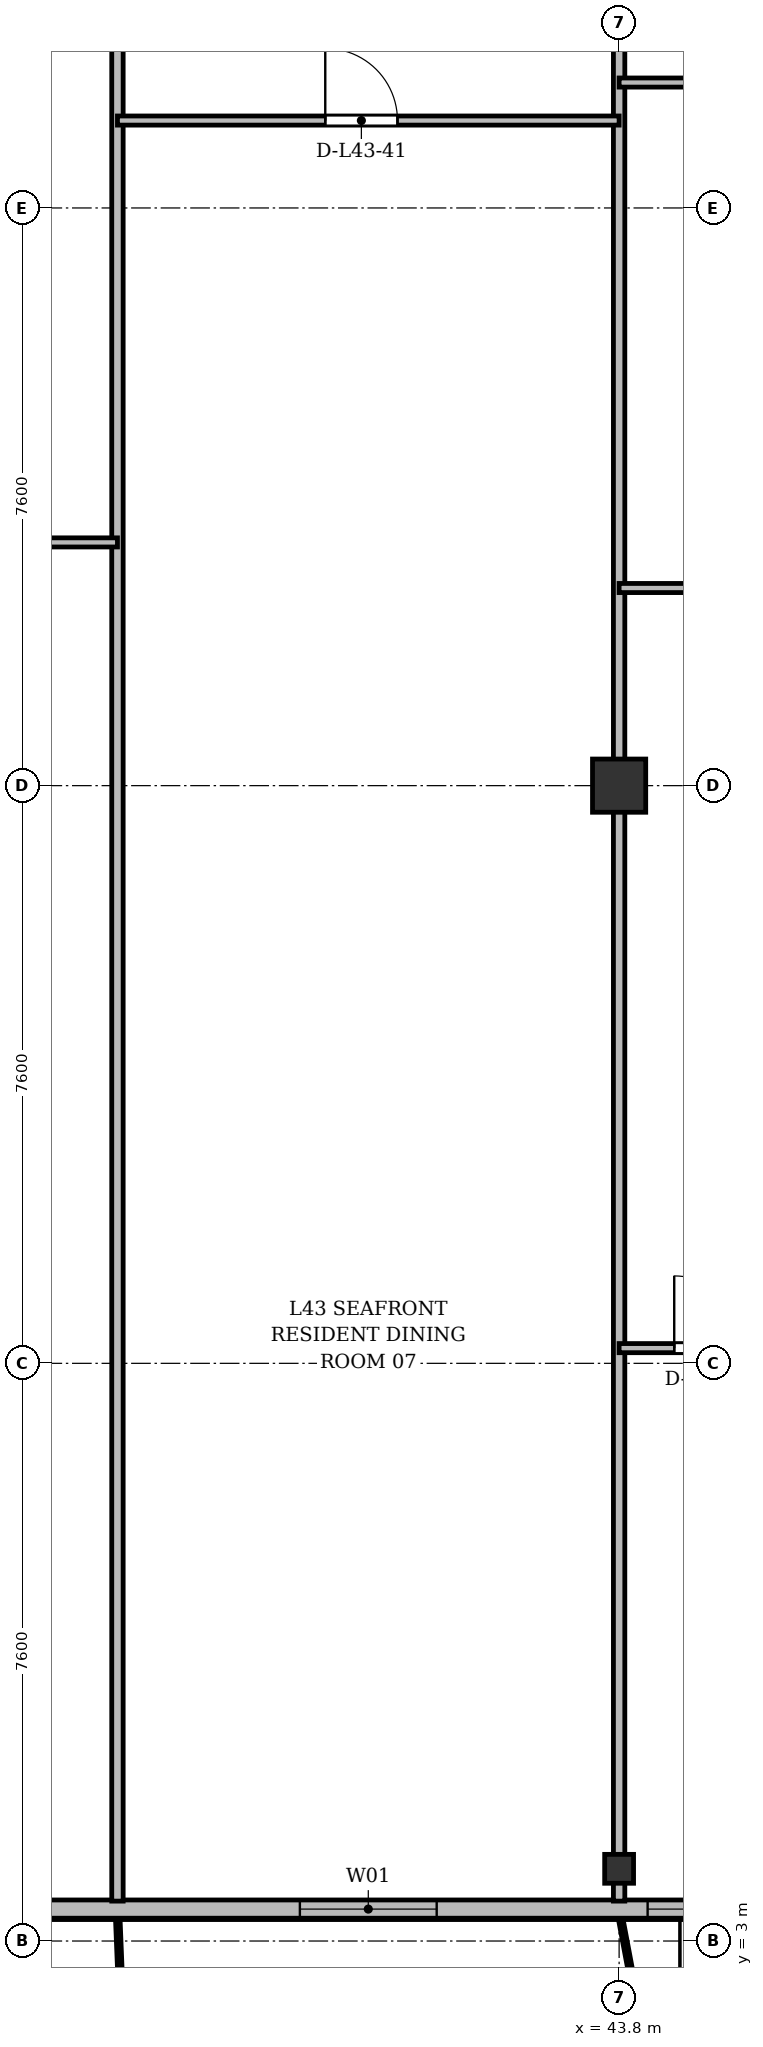
"""IFC4 building model, lengths in metres.
Left out: names, types, materials, properties, quantities, classifications, styles, units other than length and angle.
Written with IfcOpenShell. Run it as: python <this file> out.ifc"""

import sys

from ifc_helpers import new_model, si_unit, direction, frame, frame_2d, origin, origin_2d, place, context, subcontext, project, spatial, rectangle, i_section, extrude, source, transform, mapped, element, fill, save


model = new_model("IFC4")
c1 = context("Model", 3, precision=1e-05, world=origin(), true_north=direction((0.0, 1.0)))
c2 = subcontext(c1, "Body", "Model", "MODEL_VIEW")
j1 = project(units=[si_unit("LENGTHUNIT", "METRE"), si_unit("PLANEANGLEUNIT", "RADIAN")], contexts=[c1])
p1 = place(None, origin())
s1 = spatial("IfcSite", under=j1, at=p1, CompositionType="ELEMENT")
p2 = place(p1, origin())
s2 = spatial("IfcBuilding", under=s1, at=p2, CompositionType="ELEMENT")
p3 = place(p2, frame((0.0, 0.0, 164.5)))
s3 = spatial("IfcBuildingStorey", under=s2, at=p3, CompositionType="ELEMENT", Elevation=164.5)
m1 = source(origin(), c2, "Body", "SweptSolid", [
    extrude(i_section(OverallWidth=0.38, OverallDepth=0.38, WebThickness=0.02, FlangeThickness=0.03, at=origin_2d()), origin(), (0.0, 0.0, 1.0), 3.6),
])
p4 = place(p3, frame((43.8, 3.95, 0.0), z_axis=(0.0, 0.0, 1.0), x_axis=(1.0, 0.0, 0.0)))
e1 = element("IfcColumn", 1, at=p4, inside=s3, PredefinedType="COLUMN", context=c2, shape_type="MappedRepresentation", body=[
    mapped(m1, transform((0.0, 0.0, 0.0), x_axis=(1.0, 0.0, 0.0), y_axis=(0.0, 1.0, 0.0), z_axis=(0.0, 0.0, 1.0), scale=1.0)),
])
m2 = source(origin(), c2, "Body", "SweptSolid", [
    extrude(rectangle(XDim=0.7, YDim=0.7, at=origin_2d()), origin(), (0.0, 0.0, 1.0), 3.6),
])
p5 = place(p3, frame((43.8, 18.2, 0.0), z_axis=(0.0, 0.0, 1.0), x_axis=(1.0, 0.0, 0.0)))
e2 = element("IfcColumn", 2, at=p5, inside=s3, PredefinedType="COLUMN", context=c2, shape_type="MappedRepresentation", body=[
    mapped(m2, transform((0.0, 0.0, 0.0), x_axis=(1.0, 0.0, 0.0), y_axis=(0.0, 1.0, 0.0), z_axis=(0.0, 0.0, 1.0), scale=1.0)),
])
p6 = place(p3, frame((63.6, 3.42, 0.0), z_axis=(0.0, 0.0, 1.0), x_axis=(-1.0, 0.0, 0.0)))
e3 = element("IfcWall", 3, at=p6, inside=s3, PredefinedType="SOLIDWALL", context=c2, shape_type="SweptSolid", body=[
    extrude(rectangle(XDim=52.8, YDim=0.24, at=frame_2d((26.4, 0.0))), origin(), (0.0, 0.0, 1.0), 3.35),
])
p7 = place(p6, frame((1.445, 0.0, 0.9)))
e4 = element("IfcOpeningElement", 4, at=p7, cuts=e3, PredefinedType="OPENING", context=c2, shape_type="SweptSolid", body=[
    extrude(rectangle(XDim=2.0, YDim=1.95, at=frame_2d((1.0, 0.975))), frame((0.0, 0.13, 0.0), z_axis=(0.0, -1.0, 0.0), x_axis=(1.0, 0.0, 0.0)), (0.0, 0.0, 1.0), 0.26),
])
p8 = place(p6, frame((5.275, 0.0, 0.9)))
e5 = element("IfcOpeningElement", 5, at=p8, cuts=e3, PredefinedType="OPENING", context=c2, shape_type="SweptSolid", body=[
    extrude(rectangle(XDim=1.65, YDim=1.85, at=frame_2d((0.825, 0.925))), frame((0.0, 0.13, 0.0), z_axis=(0.0, -1.0, 0.0), x_axis=(1.0, 0.0, 0.0)), (0.0, 0.0, 1.0), 0.26),
])
p9 = place(p6, frame((7.65, 0.0, 0.9)))
e6 = element("IfcOpeningElement", 6, at=p9, cuts=e3, PredefinedType="OPENING", context=c2, shape_type="SweptSolid", body=[
    extrude(rectangle(XDim=1.5, YDim=1.75, at=frame_2d((0.75, 0.875))), frame((0.0, 0.13, 0.0), z_axis=(0.0, -1.0, 0.0), x_axis=(1.0, 0.0, 0.0)), (0.0, 0.0, 1.0), 0.26),
])
p10 = place(p6, frame((9.9, 0.0, 0.9)))
e7 = element("IfcOpeningElement", 7, at=p10, cuts=e3, PredefinedType="OPENING", context=c2, shape_type="SweptSolid", body=[
    extrude(rectangle(XDim=2.2, YDim=1.8, at=frame_2d((1.1, 0.9))), frame((0.0, 0.13, 0.0), z_axis=(0.0, -1.0, 0.0), x_axis=(1.0, 0.0, 0.0)), (0.0, 0.0, 1.0), 0.26),
])
p11 = place(p6, frame((13.62, 0.0, 0.0)))
e8 = element("IfcOpeningElement", 8, at=p11, cuts=e3, PredefinedType="OPENING", context=c2, shape_type="SweptSolid", body=[
    extrude(rectangle(XDim=1.2, YDim=2.2, at=frame_2d((0.6, 1.1))), frame((0.0, 0.13, 0.0), z_axis=(0.0, -1.0, 0.0), x_axis=(1.0, 0.0, 0.0)), (0.0, 0.0, 1.0), 0.26),
])
p12 = place(p6, frame((15.45, 0.0, 0.9)))
e9 = element("IfcOpeningElement", 9, at=p12, cuts=e3, PredefinedType="OPENING", context=c2, shape_type="SweptSolid", body=[
    extrude(rectangle(XDim=1.5, YDim=1.75, at=frame_2d((0.75, 0.875))), frame((0.0, 0.13, 0.0), z_axis=(0.0, -1.0, 0.0), x_axis=(1.0, 0.0, 0.0)), (0.0, 0.0, 1.0), 0.26),
])
p13 = place(p6, frame((17.775, 0.0, 0.9)))
e10 = element("IfcOpeningElement", 10, at=p13, cuts=e3, PredefinedType="OPENING", context=c2, shape_type="SweptSolid", body=[
    extrude(rectangle(XDim=1.65, YDim=1.85, at=frame_2d((0.825, 0.925))), frame((0.0, 0.13, 0.0), z_axis=(0.0, -1.0, 0.0), x_axis=(1.0, 0.0, 0.0)), (0.0, 0.0, 1.0), 0.26),
])
p14 = place(p6, frame((22.2, 0.0, 0.9)))
e11 = element("IfcOpeningElement", 11, at=p14, cuts=e3, PredefinedType="OPENING", context=c2, shape_type="SweptSolid", body=[
    extrude(rectangle(XDim=1.8, YDim=1.8, at=frame_2d((0.9, 0.9))), frame((0.0, 0.13, 0.0), z_axis=(0.0, -1.0, 0.0), x_axis=(1.0, 0.0, 0.0)), (0.0, 0.0, 1.0), 0.26),
])
p15 = place(p6, frame((28.6, 0.0, 0.9)))
e12 = element("IfcOpeningElement", 12, at=p15, cuts=e3, PredefinedType="OPENING", context=c2, shape_type="SweptSolid", body=[
    extrude(rectangle(XDim=2.2, YDim=1.8, at=frame_2d((1.1, 0.9))), frame((0.0, 0.13, 0.0), z_axis=(0.0, -1.0, 0.0), x_axis=(1.0, 0.0, 0.0)), (0.0, 0.0, 1.0), 0.26),
])
p16 = place(p6, frame((35.85, 0.0, 0.9)))
e13 = element("IfcOpeningElement", 13, at=p16, cuts=e3, PredefinedType="OPENING", context=c2, shape_type="SweptSolid", body=[
    extrude(rectangle(XDim=1.5, YDim=1.75, at=frame_2d((0.75, 0.875))), frame((0.0, 0.13, 0.0), z_axis=(0.0, -1.0, 0.0), x_axis=(1.0, 0.0, 0.0)), (0.0, 0.0, 1.0), 0.26),
])
p17 = place(p6, frame((41.656, 0.0, 0.0)))
e14 = element("IfcOpeningElement", 14, at=p17, cuts=e3, PredefinedType="OPENING", context=c2, shape_type="SweptSolid", body=[
    extrude(rectangle(XDim=1.2, YDim=2.2, at=frame_2d((0.6, 1.1))), frame((0.0, 0.13, 0.0), z_axis=(0.0, -1.0, 0.0), x_axis=(1.0, 0.0, 0.0)), (0.0, 0.0, 1.0), 0.26),
])
p18 = place(p6, frame((43.65, 0.0, 0.9)))
e15 = element("IfcOpeningElement", 15, at=p18, cuts=e3, PredefinedType="OPENING", context=c2, shape_type="SweptSolid", body=[
    extrude(rectangle(XDim=1.5, YDim=1.75, at=frame_2d((0.75, 0.875))), frame((0.0, 0.13, 0.0), z_axis=(0.0, -1.0, 0.0), x_axis=(1.0, 0.0, 0.0)), (0.0, 0.0, 1.0), 0.26),
])
p19 = place(p6, frame((45.8, 0.0, 0.9)))
e16 = element("IfcOpeningElement", 16, at=p19, cuts=e3, PredefinedType="OPENING", context=c2, shape_type="SweptSolid", body=[
    extrude(rectangle(XDim=1.8, YDim=1.8, at=frame_2d((0.9, 0.9))), frame((0.0, 0.13, 0.0), z_axis=(0.0, -1.0, 0.0), x_axis=(1.0, 0.0, 0.0)), (0.0, 0.0, 1.0), 0.26),
])
p20 = place(p6, frame((49.255, 0.0, 0.9)))
e17 = element("IfcOpeningElement", 17, at=p20, cuts=e3, PredefinedType="OPENING", context=c2, shape_type="SweptSolid", body=[
    extrude(rectangle(XDim=2.2, YDim=1.8, at=frame_2d((1.1, 0.9))), frame((0.0, 0.13, 0.0), z_axis=(0.0, -1.0, 0.0), x_axis=(1.0, 0.0, 0.0)), (0.0, 0.0, 1.0), 0.26),
])
p21 = place(p3, frame((37.2, 3.525, 0.0), z_axis=(0.0, 0.0, 1.0), x_axis=(0.0, 1.0, 0.0)))
e18 = element("IfcWall", 18, at=p21, inside=s3, PredefinedType="PARTITIONING", context=c2, shape_type="SweptSolid", body=[
    extrude(rectangle(XDim=27.275, YDim=0.15, at=frame_2d((13.638, 0.0))), origin(), (0.0, 0.0, 1.0), 2.75),
])
p22 = place(p3, frame((43.8, 3.525, 0.0), z_axis=(0.0, 0.0, 1.0), x_axis=(0.0, 1.0, 0.0)))
e19 = element("IfcWall", 19, at=p22, inside=s3, PredefinedType="PARTITIONING", context=c2, shape_type="SweptSolid", body=[
    extrude(rectangle(XDim=27.275, YDim=0.15, at=frame_2d((13.638, 0.0))), origin(), (0.0, 0.0, 1.0), 2.85),
])
p23 = place(p3, frame((30.6, 21.4, 0.0), z_axis=(0.0, 0.0, 1.0), x_axis=(1.0, 0.0, 0.0)))
e20 = element("IfcWall", 20, at=p23, inside=s3, PredefinedType="PARTITIONING", context=c2, shape_type="SweptSolid", body=[
    extrude(rectangle(XDim=6.6, YDim=0.12, at=frame_2d((3.3, 0.0))), origin(), (0.0, 0.0, 1.0), 2.85),
])
p24 = place(p23, frame((2.734, 0.0, 0.0)))
e21 = element("IfcOpeningElement", 21, at=p24, cuts=e20, PredefinedType="OPENING", context=c2, shape_type="SweptSolid", body=[
    extrude(rectangle(XDim=0.95, YDim=2.15, at=frame_2d((0.475, 1.075))), frame((0.0, 0.07, 0.0), z_axis=(0.0, -1.0, 0.0), x_axis=(1.0, 0.0, 0.0)), (0.0, 0.0, 1.0), 0.14),
])
p25 = place(p3, frame((37.2, 26.95, 0.0), z_axis=(0.0, 0.0, 1.0), x_axis=(1.0, 0.0, 0.0)))
e22 = element("IfcWall", 22, at=p25, inside=s3, PredefinedType="PARTITIONING", context=c2, shape_type="SweptSolid", body=[
    extrude(rectangle(XDim=6.6, YDim=0.12, at=frame_2d((3.3, 0.0))), origin(), (0.0, 0.0, 1.0), 2.85),
])
p26 = place(p25, frame((2.734, 0.0, 0.0)))
e23 = element("IfcOpeningElement", 23, at=p26, cuts=e22, PredefinedType="OPENING", context=c2, shape_type="SweptSolid", body=[
    extrude(rectangle(XDim=0.95, YDim=2.15, at=frame_2d((0.475, 1.075))), frame((0.0, 0.07, 0.0), z_axis=(0.0, -1.0, 0.0), x_axis=(1.0, 0.0, 0.0)), (0.0, 0.0, 1.0), 0.14),
])
p27 = place(p3, frame((43.8, 20.8, 0.0), z_axis=(0.0, 0.0, 1.0), x_axis=(1.0, 0.0, 0.0)))
e24 = element("IfcWall", 24, at=p27, inside=s3, PredefinedType="PARTITIONING", context=c2, shape_type="SweptSolid", body=[
    extrude(rectangle(XDim=7.2, YDim=0.12, at=frame_2d((3.6, 0.0))), origin(), (0.0, 0.0, 1.0), 2.85),
])
p28 = place(p27, frame((3.125, 0.0, 0.0)))
e25 = element("IfcOpeningElement", 25, at=p28, cuts=e24, PredefinedType="OPENING", context=c2, shape_type="SweptSolid", body=[
    extrude(rectangle(XDim=0.95, YDim=2.15, at=frame_2d((0.475, 1.075))), frame((0.0, 0.07, 0.0), z_axis=(0.0, -1.0, 0.0), x_axis=(1.0, 0.0, 0.0)), (0.0, 0.0, 1.0), 0.14),
])
p29 = place(p3, frame((43.8, 27.45, 0.0), z_axis=(0.0, 0.0, 1.0), x_axis=(1.0, 0.0, 0.0)))
e26 = element("IfcWall", 26, at=p29, inside=s3, PredefinedType="PARTITIONING", context=c2, shape_type="SweptSolid", body=[
    extrude(rectangle(XDim=2.4, YDim=0.12, at=frame_2d((1.2, 0.0))), origin(), (0.0, 0.0, 1.0), 2.85),
])
p30 = place(p3, frame((43.8, 10.8, 0.0), z_axis=(0.0, 0.0, 1.0), x_axis=(1.0, 0.0, 0.0)))
e27 = element("IfcWall", 27, at=p30, inside=s3, PredefinedType="PARTITIONING", context=c2, shape_type="SweptSolid", body=[
    extrude(rectangle(XDim=2.4, YDim=0.12, at=frame_2d((1.2, 0.0))), origin(), (0.0, 0.0, 1.0), 2.85),
])
p31 = place(p30, frame((0.725, 0.0, 0.0)))
e28 = element("IfcOpeningElement", 28, at=p31, cuts=e27, PredefinedType="OPENING", context=c2, shape_type="SweptSolid", body=[
    extrude(rectangle(XDim=0.95, YDim=2.15, at=frame_2d((0.475, 1.075))), frame((0.0, 0.07, 0.0), z_axis=(0.0, -1.0, 0.0), x_axis=(1.0, 0.0, 0.0)), (0.0, 0.0, 1.0), 0.14),
])
m3 = source(origin(), c2, "Body", "SweptSolid", [
    extrude(rectangle(XDim=1.65, YDim=1.85, at=frame_2d((0.825, 0.925))), frame((0.0, 0.03, 0.0), z_axis=(0.0, -1.0, 0.0), x_axis=(1.0, 0.0, 0.0)), (0.0, 0.0, 1.0), 0.06),
])
p32 = place(p13, origin())
e29 = element("IfcWindow", 29, at=p32, inside=s3, PartitioningType="SINGLE_PANEL", PredefinedType="WINDOW", context=c2, shape_type="MappedRepresentation", body=[
    mapped(m3, transform((0.0, 0.0, 0.0), x_axis=(1.0, 0.0, 0.0), y_axis=(0.0, 1.0, 0.0), z_axis=(0.0, 0.0, 1.0), scale=1.0)),
])
fill(e10, e29)
m4 = source(origin(), c2, "Body", "SweptSolid", [
    extrude(rectangle(XDim=1.8, YDim=1.8, at=frame_2d((0.9, 0.9))), frame((0.0, 0.03, 0.0), z_axis=(0.0, -1.0, 0.0), x_axis=(1.0, 0.0, 0.0)), (0.0, 0.0, 1.0), 0.06),
])
p33 = place(p14, origin())
e30 = element("IfcWindow", 30, at=p33, inside=s3, PartitioningType="SINGLE_PANEL", PredefinedType="WINDOW", context=c2, shape_type="MappedRepresentation", body=[
    mapped(m4, transform((0.0, 0.0, 0.0), x_axis=(1.0, 0.0, 0.0), y_axis=(0.0, 1.0, 0.0), z_axis=(0.0, 0.0, 1.0), scale=1.0)),
])
fill(e11, e30)
m5 = source(origin(), c2, "Body", "SweptSolid", [
    extrude(rectangle(XDim=0.95, YDim=2.15, at=frame_2d((0.475, 1.075))), frame((0.0, 0.025, 0.0), z_axis=(0.0, -1.0, 0.0), x_axis=(1.0, 0.0, 0.0)), (0.0, 0.0, 1.0), 0.05),
])
p34 = place(p26, origin())
e31 = element("IfcDoor", 31, at=p34, inside=s3, OperationType="SINGLE_SWING_LEFT", PredefinedType="DOOR", context=c2, shape_type="MappedRepresentation", body=[
    mapped(m5, transform((0.0, 0.0, 0.0), x_axis=(1.0, 0.0, 0.0), y_axis=(0.0, 1.0, 0.0), z_axis=(0.0, 0.0, 1.0), scale=1.0)),
])
fill(e23, e31)
p35 = place(p31, origin())
e32 = element("IfcDoor", 32, at=p35, inside=s3, OperationType="SINGLE_SWING_LEFT", PredefinedType="DOOR", context=c2, shape_type="MappedRepresentation", body=[
    mapped(m5, transform((0.0, 0.0, 0.0), x_axis=(1.0, 0.0, 0.0), y_axis=(0.0, 1.0, 0.0), z_axis=(0.0, 0.0, 1.0), scale=1.0)),
])
fill(e28, e32)
save(model, sys.argv[1])
